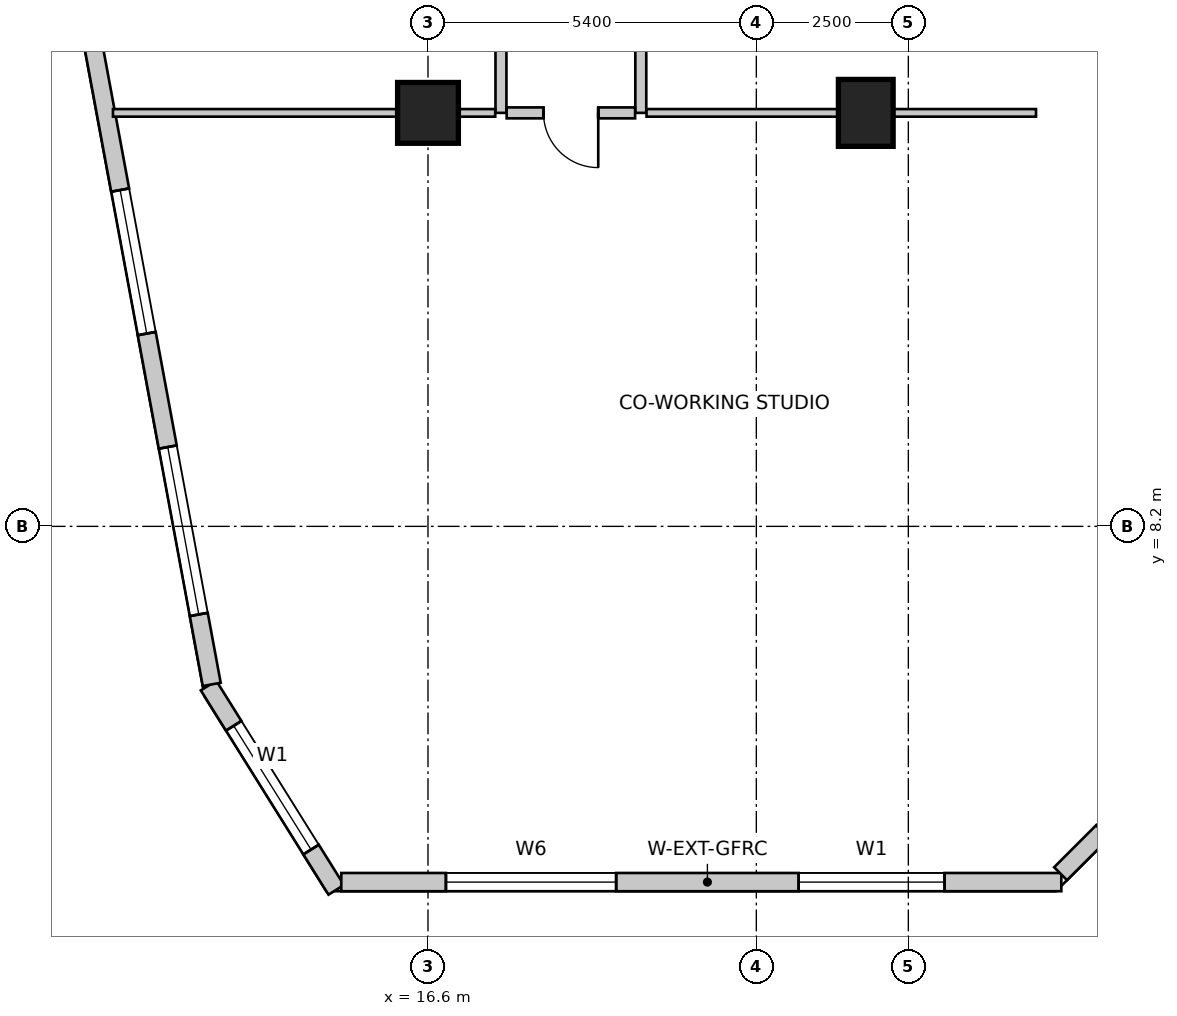
"""IFC4 building model, lengths in metres.
Left out: names, types, materials, properties, quantities, classifications, styles, units other than length and angle.
Written with IfcOpenShell. Run it as: python <this file> out.ifc"""

import sys

from ifc_helpers import new_model, si_unit, direction, frame, frame_2d, origin, origin_2d, place, context, subcontext, project, spatial, rectangle, extrude, source, transform, mapped, element, fill, save


model = new_model("IFC4")
c1 = context("Model", 3, precision=1e-05, world=origin(), true_north=direction((0.0, 1.0)))
c2 = subcontext(c1, "Body", "Model", "MODEL_VIEW")
j1 = project(units=[si_unit("LENGTHUNIT", "METRE"), si_unit("PLANEANGLEUNIT", "RADIAN")], contexts=[c1])
p1 = place(None, origin())
s1 = spatial("IfcSite", under=j1, at=p1, CompositionType="ELEMENT")
p2 = place(p1, origin())
s2 = spatial("IfcBuilding", under=s1, at=p2, CompositionType="ELEMENT")
p3 = place(p2, frame((0.0, 0.0, 59.0)))
s3 = spatial("IfcBuildingStorey", under=s2, at=p3, CompositionType="ELEMENT", Elevation=59.0)
m1 = source(origin(), c2, "Body", "SweptSolid", [
    extrude(rectangle(XDim=0.9, YDim=1.1, at=origin_2d()), origin(), (0.0, 0.0, 1.0), 4.0),
])
p4 = place(p3, frame((23.8, 15.0, 0.0), z_axis=(0.0, 0.0, 1.0), x_axis=(1.0, 0.0, 0.0)))
e1 = element("IfcColumn", 1, at=p4, inside=s3, PredefinedType="COLUMN", context=c2, shape_type="MappedRepresentation", body=[
    mapped(m1, transform((0.0, 0.0, 0.0), scale=1.0)),
])
m2 = source(origin(), c2, "Body", "SweptSolid", [
    extrude(rectangle(XDim=1.0, YDim=1.0, at=origin_2d()), origin(), (0.0, 0.0, 1.0), 4.0),
])
p5 = place(p3, frame((16.6, 15.0, 0.0), z_axis=(0.0, 0.0, 1.0), x_axis=(1.0, 0.0, 0.0)))
e2 = element("IfcColumn", 2, at=p5, inside=s3, PredefinedType="COLUMN", context=c2, shape_type="MappedRepresentation", body=[
    mapped(m2, transform((0.0, 0.0, 0.0), scale=1.0)),
])
p6 = place(p3, frame((12.991, 5.583, 0.0), z_axis=(0.0, 0.0, 1.0), x_axis=(0.530015557218, -0.847987918019, 0.0)))
e3 = element("IfcWall", 3, at=p6, inside=s3, PredefinedType="SOLIDWALL", context=c2, shape_type="SweptSolid", body=[
    extrude(rectangle(XDim=3.962, YDim=0.3, at=frame_2d((1.981, 0.0))), origin(), (0.0, 0.0, 1.0), 3.7),
])
m3 = source(origin(), c2, "Body", "SweptSolid", [
    extrude(rectangle(XDim=2.4, YDim=2.2, at=frame_2d((1.2, 1.1))), frame((0.0, 0.16, 0.0), z_axis=(0.0, -1.0, 0.0), x_axis=(1.0, 0.0, 0.0)), (0.0, 0.0, 1.0), 0.32),
])
p7 = place(p6, frame((0.781, 0.0, 0.85)))
e4 = element("IfcOpeningElement", 4, at=p7, cuts=e3, PredefinedType="OPENING", context=c2, shape_type="MappedRepresentation", body=[
    mapped(m3, transform((0.0, 0.0, 0.0), scale=1.0)),
])
p8 = place(p3, frame((15.174, 2.35, 0.0), z_axis=(0.0, 0.0, 1.0), x_axis=(1.0, 0.0, 0.0)))
e5 = element("IfcWall", 5, at=p8, inside=s3, PredefinedType="SOLIDWALL", context=c2, shape_type="SweptSolid", body=[
    extrude(rectangle(XDim=11.842, YDim=0.3, at=frame_2d((5.921, 0.0))), origin(), (0.0, 0.0, 1.0), 3.7),
])
m4 = source(origin(), c2, "Body", "SweptSolid", [
    extrude(rectangle(XDim=2.8, YDim=2.4, at=frame_2d((1.4, 1.2))), frame((0.0, 0.16, 0.0), z_axis=(0.0, -1.0, 0.0), x_axis=(1.0, 0.0, 0.0)), (0.0, 0.0, 1.0), 0.32),
])
p9 = place(p8, frame((1.721, 0.0, 0.85)))
e6 = element("IfcOpeningElement", 6, at=p9, cuts=e5, PredefinedType="OPENING", context=c2, shape_type="MappedRepresentation", body=[
    mapped(m4, transform((0.0, 0.0, 0.0), scale=1.0)),
])
p10 = place(p8, frame((7.522, 0.0, 0.85)))
e7 = element("IfcOpeningElement", 7, at=p10, cuts=e5, PredefinedType="OPENING", context=c2, shape_type="MappedRepresentation", body=[
    mapped(m3, transform((0.0, 0.0, 0.0), scale=1.0)),
])
p11 = place(p3, frame((27.004, 2.488, 0.0), z_axis=(0.0, 0.0, 1.0), x_axis=(0.707106781187, 0.707106781187, 0.0)))
e8 = element("IfcWall", 8, at=p11, inside=s3, PredefinedType="SOLIDWALL", context=c2, shape_type="SweptSolid", body=[
    extrude(rectangle(XDim=4.356, YDim=0.3, at=frame_2d((2.178, 0.0))), origin(), (0.0, 0.0, 1.0), 3.7),
])
p12 = place(p11, frame((0.978, 0.0, 0.85)))
e9 = element("IfcOpeningElement", 9, at=p12, cuts=e8, PredefinedType="OPENING", context=c2, shape_type="MappedRepresentation", body=[
    mapped(m3, transform((0.0, 0.0, 0.0), scale=1.0)),
])
p13 = place(p3, frame((8.183, 31.833, 0.0), z_axis=(0.0, 0.0, 1.0), x_axis=(0.18216364648, -0.983268226834, 0.0)))
e10 = element("IfcWall", 10, at=p13, inside=s3, PredefinedType="SOLIDWALL", context=c2, shape_type="SweptSolid", body=[
    extrude(rectangle(XDim=26.678, YDim=0.3, at=frame_2d((13.339, 0.0))), origin(), (0.0, 0.0, 1.0), 3.7),
])
m5 = source(origin(), c2, "Body", "SweptSolid", [
    extrude(rectangle(XDim=1.8, YDim=2.1, at=frame_2d((0.9, 1.05))), frame((0.0, 0.16, 0.0), z_axis=(0.0, -1.0, 0.0), x_axis=(1.0, 0.0, 0.0)), (0.0, 0.0, 1.0), 0.32),
])
p14 = place(p13, frame((1.164, 0.0, 0.85)))
e11 = element("IfcOpeningElement", 11, at=p14, cuts=e10, PredefinedType="OPENING", context=c2, shape_type="MappedRepresentation", body=[
    mapped(m5, transform((0.0, 0.0, 0.0), scale=1.0)),
])
p15 = place(p13, frame((4.5, 0.0, 0.85)))
e12 = element("IfcOpeningElement", 12, at=p15, cuts=e10, PredefinedType="OPENING", context=c2, shape_type="MappedRepresentation", body=[
    mapped(m3, transform((0.0, 0.0, 0.0), scale=1.0)),
])
p16 = place(p13, frame((9.076, 0.0, 0.85)))
e13 = element("IfcOpeningElement", 13, at=p16, cuts=e10, PredefinedType="OPENING", context=c2, shape_type="MappedRepresentation", body=[
    mapped(m3, transform((0.0, 0.0, 0.0), scale=1.0)),
])
p17 = place(p13, frame((13.653, 0.0, 0.85)))
e14 = element("IfcOpeningElement", 14, at=p17, cuts=e10, PredefinedType="OPENING", context=c2, shape_type="MappedRepresentation", body=[
    mapped(m3, transform((0.0, 0.0, 0.0), scale=1.0)),
])
p18 = place(p13, frame((18.411, 0.0, 0.85)))
e15 = element("IfcOpeningElement", 15, at=p18, cuts=e10, PredefinedType="OPENING", context=c2, shape_type="MappedRepresentation", body=[
    mapped(m3, transform((0.0, 0.0, 0.0), scale=1.0)),
])
p19 = place(p13, frame((22.709, 0.0, 0.85)))
e16 = element("IfcOpeningElement", 16, at=p19, cuts=e10, PredefinedType="OPENING", context=c2, shape_type="MappedRepresentation", body=[
    mapped(m4, transform((0.0, 0.0, 0.0), scale=1.0)),
])
p20 = place(p3, frame((17.8, 15.0, 0.0), z_axis=(0.0, 0.0, 1.0), x_axis=(0.0, 1.0, 0.0)))
e17 = element("IfcWall", 17, at=p20, inside=s3, PredefinedType="PARTITIONING", context=c2, shape_type="SweptSolid", body=[
    extrude(rectangle(XDim=4.66, YDim=0.18, at=frame_2d((2.33, 0.0))), origin(), (0.0, 0.0, 1.0), 2.842),
])
m6 = source(origin(), c2, "Body", "SweptSolid", [
    extrude(rectangle(XDim=0.9, YDim=2.15, at=frame_2d((0.45, 1.075))), frame((0.0, 0.1, 0.0), z_axis=(0.0, -1.0, 0.0), x_axis=(1.0, 0.0, 0.0)), (0.0, 0.0, 1.0), 0.2),
])
p21 = place(p20, frame((1.88, 0.0, 0.0)))
e18 = element("IfcOpeningElement", 18, at=p21, cuts=e17, PredefinedType="OPENING", context=c2, shape_type="MappedRepresentation", body=[
    mapped(m6, transform((0.0, 0.0, 0.0), scale=1.0)),
])
p22 = place(p3, frame((20.1, 19.66, 0.0), z_axis=(0.0, 0.0, 1.0), x_axis=(0.0, -1.0, 0.0)))
e19 = element("IfcWall", 19, at=p22, inside=s3, PredefinedType="PARTITIONING", context=c2, shape_type="SweptSolid", body=[
    extrude(rectangle(XDim=4.66, YDim=0.18, at=frame_2d((2.33, 0.0))), origin(), (0.0, 0.0, 1.0), 2.842),
])
p23 = place(p22, frame((1.88, 0.0, 0.0)))
e20 = element("IfcOpeningElement", 20, at=p23, cuts=e19, PredefinedType="OPENING", context=c2, shape_type="MappedRepresentation", body=[
    mapped(m6, transform((0.0, 0.0, 0.0), scale=1.0)),
])
p24 = place(p3, frame((20.006, 15.0, 0.0), z_axis=(0.0, 0.0, 1.0), x_axis=(-1.0, 0.0, 0.0)))
e21 = element("IfcWall", 21, at=p24, inside=s3, PredefinedType="PARTITIONING", context=c2, shape_type="SweptSolid", body=[
    extrude(rectangle(XDim=2.112, YDim=0.18, at=frame_2d((1.056, 0.0))), origin(), (0.0, 0.0, 1.0), 2.842),
])
p25 = place(p24, frame((0.606, 0.0, 0.0)))
e22 = element("IfcOpeningElement", 22, at=p25, cuts=e21, PredefinedType="OPENING", context=c2, shape_type="MappedRepresentation", body=[
    mapped(m6, transform((0.0, 0.0, 0.0), scale=1.0)),
])
p26 = place(p3, frame((17.706, 15.0, 0.0), z_axis=(0.0, 0.0, 1.0), x_axis=(-1.0, 0.0, 0.0)))
e23 = element("IfcWall", 23, at=p26, inside=s3, PredefinedType="PARTITIONING", context=c2, shape_type="SweptSolid", body=[
    extrude(rectangle(XDim=6.287, YDim=0.125, at=frame_2d((3.144, 0.0))), origin(), (0.0, 0.0, 1.0), 2.842),
])
p27 = place(p3, frame((26.6, 15.0, 0.0), z_axis=(0.0, 0.0, 1.0), x_axis=(-1.0, 0.0, 0.0)))
e24 = element("IfcWall", 24, at=p27, inside=s3, PredefinedType="PARTITIONING", context=c2, shape_type="SweptSolid", body=[
    extrude(rectangle(XDim=6.406, YDim=0.125, at=frame_2d((3.203, 0.0))), origin(), (0.0, 0.0, 1.0), 2.842),
])
m7 = source(origin(), c2, "Body", "SweptSolid", [
    extrude(rectangle(XDim=2.4, YDim=2.2, at=frame_2d((1.2, 1.1))), frame((0.0, -0.015, 0.0), z_axis=(0.0, -1.0, 0.0), x_axis=(1.0, 0.0, 0.0)), (0.0, 0.0, 1.0), 0.06),
])
p28 = place(p7, origin())
e25 = element("IfcWindow", 25, at=p28, inside=s3, PartitioningType="SINGLE_PANEL", PredefinedType="WINDOW", context=c2, shape_type="MappedRepresentation", body=[
    mapped(m7, transform((0.0, 0.0, 0.0), scale=1.0)),
])
fill(e4, e25)
m8 = source(origin(), c2, "Body", "SweptSolid", [
    extrude(rectangle(XDim=2.8, YDim=2.4, at=frame_2d((1.4, 1.2))), frame((0.0, -0.015, 0.0), z_axis=(0.0, -1.0, 0.0), x_axis=(1.0, 0.0, 0.0)), (0.0, 0.0, 1.0), 0.06),
])
p29 = place(p9, origin())
e26 = element("IfcWindow", 26, at=p29, inside=s3, PartitioningType="SINGLE_PANEL", PredefinedType="WINDOW", context=c2, shape_type="MappedRepresentation", body=[
    mapped(m8, transform((0.0, 0.0, 0.0), scale=1.0)),
])
fill(e6, e26)
p30 = place(p10, origin())
e27 = element("IfcWindow", 27, at=p30, inside=s3, PartitioningType="SINGLE_PANEL", PredefinedType="WINDOW", context=c2, shape_type="MappedRepresentation", body=[
    mapped(m7, transform((0.0, 0.0, 0.0), scale=1.0)),
])
fill(e7, e27)
p31 = place(p18, origin())
e28 = element("IfcWindow", 28, at=p31, inside=s3, PartitioningType="SINGLE_PANEL", PredefinedType="WINDOW", context=c2, shape_type="MappedRepresentation", body=[
    mapped(m7, transform((0.0, 0.0, 0.0), scale=1.0)),
])
fill(e15, e28)
p32 = place(p19, origin())
e29 = element("IfcWindow", 29, at=p32, inside=s3, PartitioningType="SINGLE_PANEL", PredefinedType="WINDOW", context=c2, shape_type="MappedRepresentation", body=[
    mapped(m8, transform((0.0, 0.0, 0.0), scale=1.0)),
])
fill(e16, e29)
m9 = source(origin(), c2, "Body", "SweptSolid", [
    extrude(rectangle(XDim=0.9, YDim=2.15, at=frame_2d((0.45, 1.075))), frame((0.0, 0.025, 0.0), z_axis=(0.0, -1.0, 0.0), x_axis=(1.0, 0.0, 0.0)), (0.0, 0.0, 1.0), 0.05),
])
p33 = place(p25, origin())
e30 = element("IfcDoor", 30, at=p33, inside=s3, OperationType="SINGLE_SWING_LEFT", PredefinedType="DOOR", context=c2, shape_type="MappedRepresentation", body=[
    mapped(m9, transform((0.0, 0.0, 0.0), scale=1.0)),
])
fill(e22, e30)
save(model, sys.argv[1])
